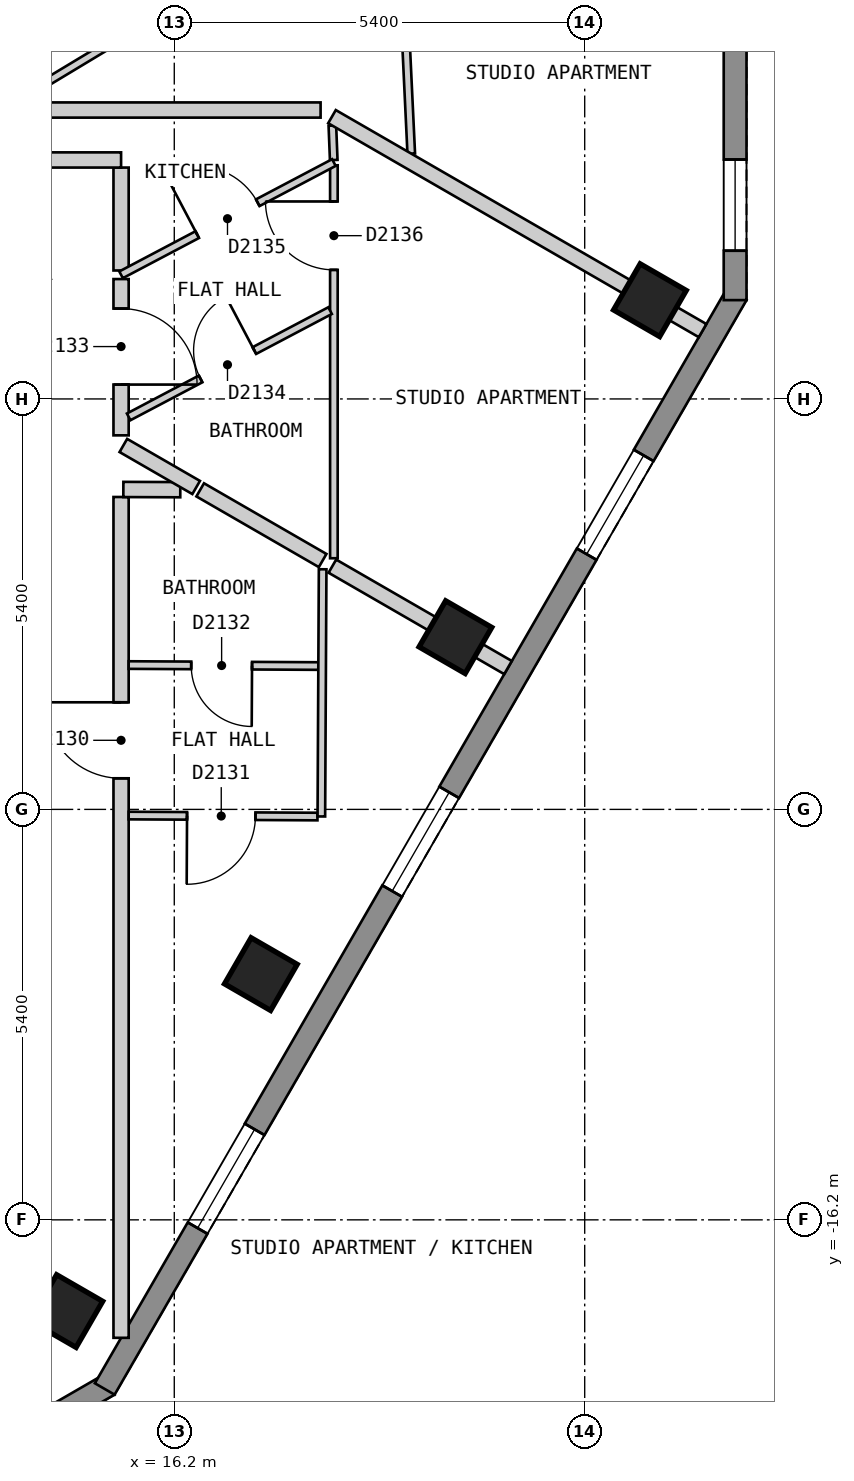
"""IFC4 building model, lengths in metres.
Left out: names, types, materials, properties, quantities, classifications, styles, units other than length and angle.
Written with IfcOpenShell. Run it as: python <this file> out.ifc"""

import sys

from ifc_helpers import new_model, si_unit, direction, frame, frame_2d, origin, origin_2d, place, context, subcontext, project, spatial, polyline, rectangle, outline, extrude, element, fill, save


model = new_model("IFC4")
c1 = context("Model", 3, precision=1e-05, world=origin(), true_north=direction((0.0, 1.0)))
c2 = subcontext(c1, "Body", "Model", "MODEL_VIEW")
j1 = project(units=[si_unit("LENGTHUNIT", "METRE"), si_unit("PLANEANGLEUNIT", "RADIAN")], contexts=[c1])
p1 = place(None, origin())
s1 = spatial("IfcSite", under=j1, at=p1, CompositionType="ELEMENT")
p2 = place(p1, origin())
s2 = spatial("IfcBuilding", under=s1, at=p2, CompositionType="ELEMENT")
p3 = place(p2, frame((0.0, 0.0, 217.8)))
s3 = spatial("IfcBuildingStorey", under=s2, at=p3, CompositionType="ELEMENT", Elevation=217.8)
for number, where, z_axis, x_axis in (
    (1, (14.78, -17.4, 0.0), (0.0, 0.0, 1.0), (0.5, 0.866, 0.0)),
    (2, (17.339, -12.967, 0.0), (0.0, 0.0, 1.0), (0.5, 0.866, 0.0)),
    (3, (19.899, -8.534, 0.0), (0.0, 0.0, 1.0), (0.5, 0.866, 0.0)),
    (4, (22.458, -4.101, 0.0), (0.0, 0.0, 1.0), (0.5, 0.866, 0.0)),
):
    element("IfcColumn", number, at=place(p3, frame(where, z_axis=z_axis, x_axis=x_axis)), inside=s3, PredefinedType="COLUMN", context=c2, shape_type="SweptSolid", body=[
        extrude(rectangle(XDim=0.7, YDim=0.7, at=origin_2d()), origin(), (0.0, 0.0, 1.0), 3.0),
    ])
p4 = place(p3, frame((11.01, -20.87, 0.0), z_axis=(0.0, 0.0, 1.0), x_axis=(0.866022959057, 0.500004234368, 0.0)))
e5 = element("IfcWall", 5, at=p4, inside=s3, PredefinedType="SOLIDWALL", context=c2, shape_type="SweptSolid", body=[
    extrude(outline(polyline([(0.0, -0.15), (5.0, -0.15), (4.92, 0.15), (0.08, 0.15), (0.0, -0.15)])), origin(), (0.0, 0.0, 1.0), 2.7),
])
p5 = place(p4, frame((0.65, 0.0, 0.15)))
e6 = element("IfcOpeningElement", 6, at=p5, cuts=e5, PredefinedType="OPENING", context=c2, shape_type="SweptSolid", body=[
    extrude(rectangle(XDim=1.2, YDim=2.1, at=frame_2d((0.6, 1.05))), frame((0.0, 0.16, 0.0), z_axis=(0.0, -1.0, 0.0), x_axis=(1.0, 0.0, 0.0)), (0.0, 0.0, 1.0), 0.32),
])
p6 = place(p3, frame((15.285, -18.425, 0.0), z_axis=(0.0, 0.0, 1.0), x_axis=(0.500012653391, 0.866018098222, 0.0)))
e7 = element("IfcWall", 7, at=p6, inside=s3, PredefinedType="SOLIDWALL", context=c2, shape_type="SweptSolid", body=[
    extrude(outline(polyline([(0.0, -0.15), (16.628, -0.15), (16.548, 0.15), (0.08, 0.15), (0.0, -0.15)])), origin(), (0.0, 0.0, 1.0), 2.7),
])
p7 = place(p6, frame((2.444, 0.0, 0.15)))
e8 = element("IfcOpeningElement", 8, at=p7, cuts=e7, PredefinedType="OPENING", context=c2, shape_type="SweptSolid", body=[
    extrude(rectangle(XDim=1.5, YDim=2.1, at=frame_2d((0.75, 1.05))), frame((0.0, 0.16, 0.0), z_axis=(0.0, -1.0, 0.0), x_axis=(1.0, 0.0, 0.0)), (0.0, 0.0, 1.0), 0.32),
])
p8 = place(p6, frame((7.564, 0.0, 0.15)))
e9 = element("IfcOpeningElement", 9, at=p8, cuts=e7, PredefinedType="OPENING", context=c2, shape_type="SweptSolid", body=[
    extrude(rectangle(XDim=1.5, YDim=2.1, at=frame_2d((0.75, 1.05))), frame((0.0, 0.16, 0.0), z_axis=(0.0, -1.0, 0.0), x_axis=(1.0, 0.0, 0.0)), (0.0, 0.0, 1.0), 0.32),
])
p9 = place(p6, frame((12.682, 0.0, 0.15)))
e10 = element("IfcOpeningElement", 10, at=p9, cuts=e7, PredefinedType="OPENING", context=c2, shape_type="SweptSolid", body=[
    extrude(rectangle(XDim=1.5, YDim=2.1, at=frame_2d((0.75, 1.05))), frame((0.0, 0.16, 0.0), z_axis=(0.0, -1.0, 0.0), x_axis=(1.0, 0.0, 0.0)), (0.0, 0.0, 1.0), 0.32),
])
p10 = place(p3, frame((23.579, -4.1, 0.0), z_axis=(0.0, 0.0, 1.0), x_axis=(0.0, 1.0, 0.0)))
e11 = element("IfcWall", 11, at=p10, inside=s3, PredefinedType="SOLIDWALL", context=c2, shape_type="SweptSolid", body=[
    extrude(outline(polyline([(0.0, -0.15), (5.0, -0.15), (4.92, 0.15), (0.08, 0.15), (0.0, -0.15)])), origin(), (0.0, 0.0, 1.0), 2.7),
])
p11 = place(p10, frame((0.65, 0.0, 0.15)))
e12 = element("IfcOpeningElement", 12, at=p11, cuts=e11, PredefinedType="OPENING", context=c2, shape_type="SweptSolid", body=[
    extrude(rectangle(XDim=1.2, YDim=2.1, at=frame_2d((0.6, 1.05))), frame((0.0, 0.16, 0.0), z_axis=(0.0, -1.0, 0.0), x_axis=(1.0, 0.0, 0.0)), (0.0, 0.0, 1.0), 0.32),
])
p12 = place(p3, frame((15.5, -2.356, 0.0), z_axis=(0.0, 0.0, 1.0), x_axis=(0.0, -1.0, 0.0)))
e13 = element("IfcWall", 13, at=p12, inside=s3, PredefinedType="PARTITIONING", context=c2, shape_type="SweptSolid", body=[
    extrude(rectangle(XDim=1.354, YDim=0.2, at=frame_2d((0.677, 0.0))), origin(), (0.0, 0.0, 1.0), 2.7),
])
p13 = place(p3, frame((12.902, -2.256, 0.0), z_axis=(0.0, 0.0, 1.0), x_axis=(1.0, 0.0, 0.0)))
e14 = element("IfcWall", 14, at=p13, inside=s3, PredefinedType="PARTITIONING", context=c2, shape_type="SweptSolid", body=[
    extrude(rectangle(XDim=2.598, YDim=0.2, at=frame_2d((1.299, 0.0))), origin(), (0.0, 0.0, 1.0), 2.7),
])
p14 = place(p3, frame((15.5, -17.752, 0.0), z_axis=(0.0, 0.0, 1.0), x_axis=(0.0, 1.0, 0.0)))
e15 = element("IfcWall", 15, at=p14, inside=s3, PredefinedType="PARTITIONING", context=c2, shape_type="SweptSolid", body=[
    extrude(rectangle(XDim=11.062, YDim=0.2, at=frame_2d((5.531, 0.0))), origin(), (0.0, 0.0, 1.0), 2.7),
])
p15 = place(p14, frame((7.361, 0.0, 0.0)))
e16 = element("IfcOpeningElement", 16, at=p15, cuts=e15, PredefinedType="OPENING", context=c2, shape_type="SweptSolid", body=[
    extrude(rectangle(XDim=1.0, YDim=2.1, at=frame_2d((0.5, 1.05))), frame((0.0, 0.11, 0.0), z_axis=(0.0, -1.0, 0.0), x_axis=(1.0, 0.0, 0.0)), (0.0, 0.0, 1.0), 0.22),
])
p16 = place(p3, frame((15.5, -5.879, 0.0), z_axis=(0.0, 0.0, 1.0), x_axis=(0.0, 1.0, 0.0)))
e17 = element("IfcWall", 17, at=p16, inside=s3, PredefinedType="PARTITIONING", context=c2, shape_type="SweptSolid", body=[
    extrude(rectangle(XDim=2.056, YDim=0.2, at=frame_2d((1.028, 0.0))), origin(), (0.0, 0.0, 1.0), 2.7),
])
p17 = place(p16, frame((0.668, 0.0, 0.0)))
e18 = element("IfcOpeningElement", 18, at=p17, cuts=e17, PredefinedType="OPENING", context=c2, shape_type="SweptSolid", body=[
    extrude(rectangle(XDim=1.0, YDim=2.1, at=frame_2d((0.5, 1.05))), frame((0.0, 0.11, 0.0), z_axis=(0.0, -1.0, 0.0), x_axis=(1.0, 0.0, 0.0)), (0.0, 0.0, 1.0), 0.22),
])
p18 = place(p3, frame((15.6, -8.901, 0.0), z_axis=(0.0, 0.0, 1.0), x_axis=(0.999986038514, -0.005284200615, 0.0)))
e19 = element("IfcWall", 19, at=p18, inside=s3, PredefinedType="PARTITIONING", context=c2, shape_type="SweptSolid", body=[
    extrude(rectangle(XDim=2.495, YDim=0.1, at=frame_2d((1.248, 0.0))), origin(), (0.0, 0.0, 1.0), 2.7),
])
p19 = place(p18, frame((0.823, 0.0, 0.0)))
e20 = element("IfcOpeningElement", 20, at=p19, cuts=e19, PredefinedType="OPENING", context=c2, shape_type="SweptSolid", body=[
    extrude(rectangle(XDim=0.8, YDim=2.1, at=frame_2d((0.4, 1.05))), frame((0.0, 0.06, 0.0), z_axis=(0.0, -1.0, 0.0), x_axis=(1.0, 0.0, 0.0)), (0.0, 0.0, 1.0), 0.12),
])
p20 = place(p3, frame((15.6, -10.881, 0.0), z_axis=(0.0, 0.0, 1.0), x_axis=(0.999986431575, -0.005209286502, 0.0)))
e21 = element("IfcWall", 21, at=p20, inside=s3, PredefinedType="PARTITIONING", context=c2, shape_type="SweptSolid", body=[
    extrude(rectangle(XDim=2.484, YDim=0.1, at=frame_2d((1.242, 0.0))), origin(), (0.0, 0.0, 1.0), 2.7),
])
p21 = place(p20, frame((0.768, 0.0, 0.0)))
e22 = element("IfcOpeningElement", 22, at=p21, cuts=e21, PredefinedType="OPENING", context=c2, shape_type="SweptSolid", body=[
    extrude(rectangle(XDim=0.9, YDim=2.1, at=frame_2d((0.45, 1.05))), frame((0.0, 0.06, 0.0), z_axis=(0.0, -1.0, 0.0), x_axis=(1.0, 0.0, 0.0)), (0.0, 0.0, 1.0), 0.12),
])
p22 = place(p3, frame((18.28, -1.804, 0.0), z_axis=(0.0, 0.0, 1.0), x_axis=(0.039839036731, -0.999206110446, 0.0)))
e23 = element("IfcWall", 23, at=p22, inside=s3, PredefinedType="PARTITIONING", context=c2, shape_type="SweptSolid", body=[
    extrude(rectangle(XDim=0.453, YDim=0.1, at=frame_2d((0.227, 0.0))), origin(), (0.0, 0.0, 1.0), 2.7),
])
p23 = place(p3, frame((19.151, 1.343, 0.0), z_axis=(0.0, 0.0, 1.0), x_axis=(0.047509130714, -0.998870803707, 0.0)))
e24 = element("IfcWall", 24, at=p23, inside=s3, PredefinedType="PARTITIONING", context=c2, shape_type="SweptSolid", body=[
    extrude(rectangle(XDim=3.52, YDim=0.1, at=frame_2d((1.76, 0.0))), origin(), (0.0, 0.0, 1.0), 2.7),
])
p24 = place(p3, frame((18.135, -10.893, 0.0), z_axis=(0.0, 0.0, 1.0), x_axis=(0.005255182688, 0.999986191432, 0.0)))
e25 = element("IfcWall", 25, at=p24, inside=s3, PredefinedType="PARTITIONING", context=c2, shape_type="SweptSolid", body=[
    extrude(rectangle(XDim=3.252, YDim=0.1, at=frame_2d((1.626, 0.0))), origin(), (0.0, 0.0, 1.0), 2.7),
])
p25 = place(p3, frame((18.3, -7.496, 0.0), z_axis=(0.0, 0.0, 1.0), x_axis=(0.0, 1.0, 0.0)))
e26 = element("IfcWall", 26, at=p25, inside=s3, PredefinedType="PARTITIONING", context=c2, shape_type="SweptSolid", body=[
    extrude(rectangle(XDim=5.17, YDim=0.1, at=frame_2d((2.585, 0.0))), origin(), (0.0, 0.0, 1.0), 2.7),
])
p26 = place(p25, frame((3.794, 0.0, 0.0)))
e27 = element("IfcOpeningElement", 27, at=p26, cuts=e26, PredefinedType="OPENING", context=c2, shape_type="SweptSolid", body=[
    extrude(rectangle(XDim=0.9, YDim=2.1, at=frame_2d((0.45, 1.05))), frame((0.0, 0.06, 0.0), z_axis=(0.0, -1.0, 0.0), x_axis=(1.0, 0.0, 0.0)), (0.0, 0.0, 1.0), 0.12),
])
p27 = place(p3, frame((15.5, -3.767, 0.0), z_axis=(0.0, 0.0, 1.0), x_axis=(0.884482889541, 0.466572628976, 0.0)))
e28 = element("IfcWall", 28, at=p27, inside=s3, PredefinedType="PARTITIONING", context=c2, shape_type="SweptSolid", body=[
    extrude(rectangle(XDim=3.166, YDim=0.1, at=frame_2d((1.583, 0.0))), origin(), (0.0, 0.0, 1.0), 2.7),
])
p28 = place(p27, frame((1.133, 0.0, 0.0)))
e29 = element("IfcOpeningElement", 29, at=p28, cuts=e28, PredefinedType="OPENING", context=c2, shape_type="SweptSolid", body=[
    extrude(rectangle(XDim=0.9, YDim=2.1, at=frame_2d((0.45, 1.05))), frame((0.0, 0.06, 0.0), z_axis=(0.0, -1.0, 0.0), x_axis=(1.0, 0.0, 0.0)), (0.0, 0.0, 1.0), 0.12),
])
p29 = place(p3, frame((15.6, -5.636, 0.0), z_axis=(0.0, 0.0, 1.0), x_axis=(0.884468832747, 0.466599275503, 0.0)))
e30 = element("IfcWall", 30, at=p29, inside=s3, PredefinedType="PARTITIONING", context=c2, shape_type="SweptSolid", body=[
    extrude(rectangle(XDim=2.996, YDim=0.1, at=frame_2d((1.498, 0.0))), origin(), (0.0, 0.0, 1.0), 2.7),
])
p30 = place(p29, frame((1.07, 0.0, 0.0)))
e31 = element("IfcOpeningElement", 31, at=p30, cuts=e30, PredefinedType="OPENING", context=c2, shape_type="SweptSolid", body=[
    extrude(rectangle(XDim=0.8, YDim=2.1, at=frame_2d((0.4, 1.05))), frame((0.0, 0.06, 0.0), z_axis=(0.0, -1.0, 0.0), x_axis=(1.0, 0.0, 0.0)), (0.0, 0.0, 1.0), 0.12),
])
p31 = place(p3, frame((14.081, -1.499, 0.0), z_axis=(0.0, 0.0, 1.0), x_axis=(0.85652273816, 0.516109289798, 0.0)))
e32 = element("IfcWall", 32, at=p31, inside=s3, PredefinedType="PARTITIONING", context=c2, shape_type="SweptSolid", body=[
    extrude(rectangle(XDim=5.537, YDim=0.1, at=frame_2d((2.769, 0.0))), origin(), (0.0, 0.0, 1.0), 2.7),
])
p32 = place(p31, frame((2.267, 0.0, 0.0)))
e33 = element("IfcOpeningElement", 33, at=p32, cuts=e32, PredefinedType="OPENING", context=c2, shape_type="SweptSolid", body=[
    extrude(rectangle(XDim=0.9, YDim=2.1, at=frame_2d((0.45, 1.05))), frame((0.0, 0.06, 0.0), z_axis=(0.0, -1.0, 0.0), x_axis=(1.0, 0.0, 0.0)), (0.0, 0.0, 1.0), 0.12),
])
p33 = place(p3, frame((15.53, -6.591, 0.0), z_axis=(0.0, 0.0, 1.0), x_axis=(0.999992350786, -0.003911312976, 0.0)))
e34 = element("IfcWall", 34, at=p33, inside=s3, PredefinedType="PARTITIONING", context=c2, shape_type="SweptSolid", body=[
    extrude(rectangle(XDim=0.749, YDim=0.2, at=frame_2d((0.375, 0.0))), origin(), (0.0, 0.0, 1.0), 2.7),
])
p34 = place(p3, frame((18.275, -1.686, 0.0), z_axis=(0.0, 0.0, 1.0), x_axis=(0.866041167766, -0.49997269499, 0.0)))
e35 = element("IfcWall", 35, at=p34, inside=s3, PredefinedType="PARTITIONING", context=c2, shape_type="SweptSolid", body=[
    extrude(rectangle(XDim=5.63, YDim=0.2, at=frame_2d((2.815, 0.0))), origin(), (0.0, 0.0, 1.0), 2.7),
])
p35 = place(p3, frame((15.53, -6.012, 0.0), z_axis=(0.0, 0.0, 1.0), x_axis=(0.866075331272, -0.499913513082, 0.0)))
e36 = element("IfcWall", 36, at=p35, inside=s3, PredefinedType="PARTITIONING", context=c2, shape_type="SweptSolid", body=[
    extrude(rectangle(XDim=1.106, YDim=0.2, at=frame_2d((0.553, 0.0))), origin(), (0.0, 0.0, 1.0), 2.7),
])
p36 = place(p3, frame((16.541, -6.596, 0.0), z_axis=(0.0, 0.0, 1.0), x_axis=(0.866078502609, -0.499908018857, 0.0)))
e37 = element("IfcWall", 37, at=p36, inside=s3, PredefinedType="PARTITIONING", context=c2, shape_type="SweptSolid", body=[
    extrude(rectangle(XDim=1.86, YDim=0.2, at=frame_2d((0.93, 0.0))), origin(), (0.0, 0.0, 1.0), 2.7),
])
p37 = place(p3, frame((18.28, -7.6, 0.0), z_axis=(0.0, 0.0, 1.0), x_axis=(0.866072847874, -0.499917815422, 0.0)))
e38 = element("IfcWall", 38, at=p37, inside=s3, PredefinedType="PARTITIONING", context=c2, shape_type="SweptSolid", body=[
    extrude(rectangle(XDim=2.668, YDim=0.2, at=frame_2d((1.334, 0.0))), origin(), (0.0, 0.0, 1.0), 2.7),
])
p38 = place(p3, frame((13.163, -1.599, 0.0), z_axis=(0.0, 0.0, 1.0), x_axis=(1.0, 0.0, 0.0)))
e39 = element("IfcWall", 39, at=p38, inside=s3, PredefinedType="PARTITIONING", context=c2, shape_type="SweptSolid", body=[
    extrude(rectangle(XDim=4.962, YDim=0.2, at=frame_2d((2.481, 0.0))), origin(), (0.0, 0.0, 1.0), 2.7),
])
p39 = place(p7, origin())
e40 = element("IfcWindow", 40, at=p39, inside=s3, PartitioningType="SINGLE_PANEL", PredefinedType="WINDOW", context=c2, shape_type="SweptSolid", body=[
    extrude(rectangle(XDim=1.5, YDim=2.1, at=frame_2d((0.75, 1.05))), frame((0.0, 0.03, 0.0), z_axis=(0.0, -1.0, 0.0), x_axis=(1.0, 0.0, 0.0)), (0.0, 0.0, 1.0), 0.06),
])
fill(e8, e40)
p40 = place(p8, origin())
e41 = element("IfcWindow", 41, at=p40, inside=s3, PartitioningType="SINGLE_PANEL", PredefinedType="WINDOW", context=c2, shape_type="SweptSolid", body=[
    extrude(rectangle(XDim=1.5, YDim=2.1, at=frame_2d((0.75, 1.05))), frame((0.0, 0.03, 0.0), z_axis=(0.0, -1.0, 0.0), x_axis=(1.0, 0.0, 0.0)), (0.0, 0.0, 1.0), 0.06),
])
fill(e9, e41)
p41 = place(p9, origin())
e42 = element("IfcWindow", 42, at=p41, inside=s3, PartitioningType="SINGLE_PANEL", PredefinedType="WINDOW", context=c2, shape_type="SweptSolid", body=[
    extrude(rectangle(XDim=1.5, YDim=2.1, at=frame_2d((0.75, 1.05))), frame((0.0, 0.03, 0.0), z_axis=(0.0, -1.0, 0.0), x_axis=(1.0, 0.0, 0.0)), (0.0, 0.0, 1.0), 0.06),
])
fill(e10, e42)
p42 = place(p11, origin())
e43 = element("IfcWindow", 43, at=p42, inside=s3, PartitioningType="SINGLE_PANEL", PredefinedType="WINDOW", context=c2, shape_type="SweptSolid", body=[
    extrude(rectangle(XDim=1.2, YDim=2.1, at=frame_2d((0.6, 1.05))), frame((0.0, 0.03, 0.0), z_axis=(0.0, -1.0, 0.0), x_axis=(1.0, 0.0, 0.0)), (0.0, 0.0, 1.0), 0.06),
])
fill(e12, e43)
p43 = place(p15, origin())
e44 = element("IfcDoor", 44, at=p43, inside=s3, OperationType="SINGLE_SWING_RIGHT", PredefinedType="DOOR", context=c2, shape_type="SweptSolid", body=[
    extrude(rectangle(XDim=1.0, YDim=2.1, at=frame_2d((0.5, 1.05))), frame((0.0, 0.025, 0.0), z_axis=(0.0, -1.0, 0.0), x_axis=(1.0, 0.0, 0.0)), (0.0, 0.0, 1.0), 0.05),
])
fill(e16, e44)
p44 = place(p21, origin())
e45 = element("IfcDoor", 45, at=p44, inside=s3, OperationType="SINGLE_SWING_LEFT", PredefinedType="DOOR", context=c2, shape_type="SweptSolid", body=[
    extrude(rectangle(XDim=0.9, YDim=2.1, at=frame_2d((0.45, 1.05))), frame((0.0, 0.025, 0.0), z_axis=(0.0, -1.0, 0.0), x_axis=(1.0, 0.0, 0.0)), (0.0, 0.0, 1.0), 0.05),
])
fill(e22, e45)
p45 = place(p19, origin())
e46 = element("IfcDoor", 46, at=p45, inside=s3, OperationType="SINGLE_SWING_RIGHT", PredefinedType="DOOR", context=c2, shape_type="SweptSolid", body=[
    extrude(rectangle(XDim=0.8, YDim=2.1, at=frame_2d((0.4, 1.05))), frame((0.0, 0.025, 0.0), z_axis=(0.0, -1.0, 0.0), x_axis=(1.0, 0.0, 0.0)), (0.0, 0.0, 1.0), 0.05),
])
fill(e20, e46)
p46 = place(p17, origin())
e47 = element("IfcDoor", 47, at=p46, inside=s3, OperationType="SINGLE_SWING_LEFT", PredefinedType="DOOR", context=c2, shape_type="SweptSolid", body=[
    extrude(rectangle(XDim=1.0, YDim=2.1, at=frame_2d((0.5, 1.05))), frame((0.0, 0.025, 0.0), z_axis=(0.0, -1.0, 0.0), x_axis=(1.0, 0.0, 0.0)), (0.0, 0.0, 1.0), 0.05),
])
fill(e18, e47)
p47 = place(p30, origin())
e48 = element("IfcDoor", 48, at=p47, inside=s3, OperationType="SINGLE_SWING_RIGHT", PredefinedType="DOOR", context=c2, shape_type="SweptSolid", body=[
    extrude(rectangle(XDim=0.8, YDim=2.1, at=frame_2d((0.4, 1.05))), frame((0.0, 0.025, 0.0), z_axis=(0.0, -1.0, 0.0), x_axis=(1.0, 0.0, 0.0)), (0.0, 0.0, 1.0), 0.05),
])
fill(e31, e48)
p48 = place(p28, origin())
e49 = element("IfcDoor", 49, at=p48, inside=s3, OperationType="SINGLE_SWING_LEFT", PredefinedType="DOOR", context=c2, shape_type="SweptSolid", body=[
    extrude(rectangle(XDim=0.9, YDim=2.1, at=frame_2d((0.45, 1.05))), frame((0.0, 0.025, 0.0), z_axis=(0.0, -1.0, 0.0), x_axis=(1.0, 0.0, 0.0)), (0.0, 0.0, 1.0), 0.05),
])
fill(e29, e49)
p49 = place(p26, origin())
e50 = element("IfcDoor", 50, at=p49, inside=s3, OperationType="SINGLE_SWING_RIGHT", PredefinedType="DOOR", context=c2, shape_type="SweptSolid", body=[
    extrude(rectangle(XDim=0.9, YDim=2.1, at=frame_2d((0.45, 1.05))), frame((0.0, 0.025, 0.0), z_axis=(0.0, -1.0, 0.0), x_axis=(1.0, 0.0, 0.0)), (0.0, 0.0, 1.0), 0.05),
])
fill(e27, e50)
save(model, sys.argv[1])
